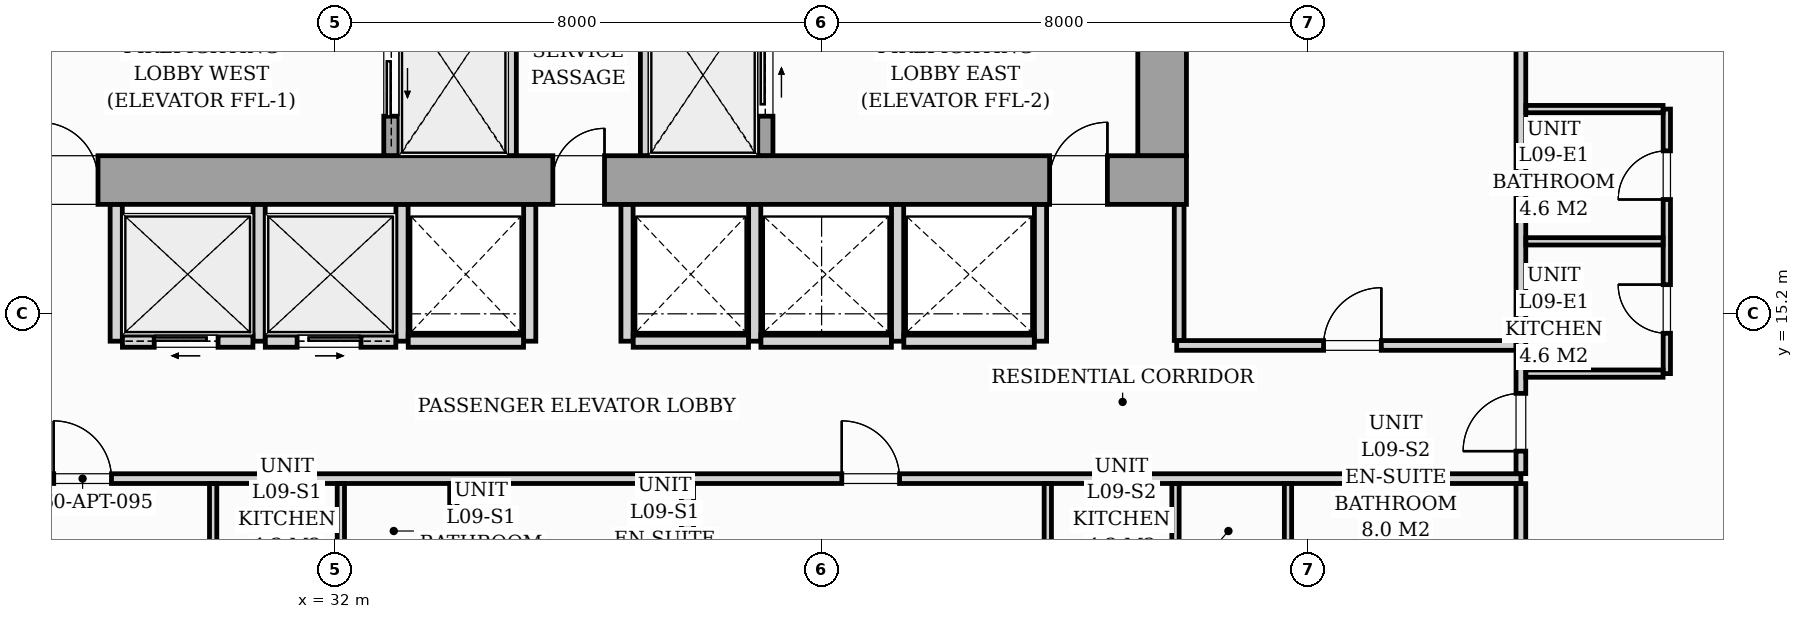
"""IFC4 building model, lengths in metres.
Left out: names, types, materials, properties, quantities, classifications, styles, units other than length and angle.
Written with IfcOpenShell. Run it as: python <this file> out.ifc"""

import sys

from ifc_helpers import new_model, si_unit, direction, frame, frame_2d, origin, origin_2d, place, context, subcontext, project, spatial, rectangle, i_section, extrude, source, transform, mapped, element, fill, save


model = new_model("IFC4")
c1 = context("Model", 3, precision=1e-05, world=origin(), true_north=direction((0.0, 1.0)))
c2 = subcontext(c1, "Body", "Model", "MODEL_VIEW")
j1 = project(units=[si_unit("LENGTHUNIT", "METRE"), si_unit("PLANEANGLEUNIT", "RADIAN")], contexts=[c1])
p1 = place(None, origin())
s1 = spatial("IfcSite", under=j1, at=p1, CompositionType="ELEMENT")
p2 = place(p1, origin())
s2 = spatial("IfcBuilding", under=s1, at=p2, CompositionType="ELEMENT")
p3 = place(p2, frame((0.0, 0.0, 35.8)))
s3 = spatial("IfcBuildingStorey", under=s2, at=p3, CompositionType="ELEMENT", Elevation=35.8)
m1 = source(origin(), c2, "Body", "SweptSolid", [
    extrude(i_section(OverallWidth=0.437, OverallDepth=0.514, WebThickness=0.061, FlangeThickness=0.097, FilletRadius=0.018, at=origin_2d()), origin(), (0.0, 0.0, 1.0), 3.196),
])
for number, where, z_axis, x_axis in (
    (1, (33.12, 17.4, 0.002), (0.0, 0.0, 1.0), (1.0, 0.0, 0.0)),
    (2, (38.88, 17.4, 0.002), (0.0, 0.0, 1.0), (1.0, 0.0, 0.0)),
    (3, (45.6, 17.4, 0.002), (0.0, 0.0, 1.0), (1.0, 0.0, 0.0)),
):
    element("IfcColumn", number, at=place(p3, frame(where, z_axis=z_axis, x_axis=x_axis)), inside=s3, PredefinedType="PILASTER", context=c2, shape_type="MappedRepresentation", body=[
        mapped(m1, transform((0.0, 0.0, 0.0), scale=1.0)),
    ])
p4 = place(p3, frame((26.0, 17.4, 0.0), z_axis=(0.0, 0.0, 1.0), x_axis=(1.0, 0.0, 0.0)))
e4 = element("IfcWall", 4, at=p4, inside=s3, PredefinedType="SHEAR", context=c2, shape_type="SweptSolid", body=[
    extrude(rectangle(XDim=20.0, YDim=0.8, at=frame_2d((10.0, 0.0))), origin(), (0.0, 0.0, 1.0), 3.2),
])
p5 = place(p4, frame((1.15, 0.0, 0.0)))
e5 = element("IfcOpeningElement", 5, at=p5, cuts=e4, PredefinedType="OPENING", context=c2, shape_type="SweptSolid", body=[
    extrude(rectangle(XDim=0.95, YDim=2.06, at=frame_2d((0.475, 1.03))), frame((0.0, 0.41, 0.0), z_axis=(0.0, -1.0, 0.0), x_axis=(1.0, 0.0, 0.0)), (0.0, 0.0, 1.0), 0.82),
])
p6 = place(p4, frame((9.58, 0.0, 0.0)))
e6 = element("IfcOpeningElement", 6, at=p6, cuts=e4, PredefinedType="OPENING", context=c2, shape_type="SweptSolid", body=[
    extrude(rectangle(XDim=0.85, YDim=2.0, at=frame_2d((0.425, 1.0))), frame((0.0, 0.41, 0.0), z_axis=(0.0, -1.0, 0.0), x_axis=(1.0, 0.0, 0.0)), (0.0, 0.0, 1.0), 0.82),
])
p7 = place(p4, frame((17.75, 0.0, 0.0)))
e7 = element("IfcOpeningElement", 7, at=p7, cuts=e4, PredefinedType="OPENING", context=c2, shape_type="SweptSolid", body=[
    extrude(rectangle(XDim=0.95, YDim=2.06, at=frame_2d((0.475, 1.03))), frame((0.0, 0.41, 0.0), z_axis=(0.0, -1.0, 0.0), x_axis=(1.0, 0.0, 0.0)), (0.0, 0.0, 1.0), 0.82),
])
p8 = place(p3, frame((45.6, 17.802, 0.0), z_axis=(0.0, 0.0, 1.0), x_axis=(0.0, 1.0, 0.0)))
e8 = element("IfcWall", 8, at=p8, inside=s3, PredefinedType="SHEAR", context=c2, shape_type="SweptSolid", body=[
    extrude(rectangle(XDim=5.796, YDim=0.8, at=frame_2d((2.898, 0.0))), origin(), (0.0, 0.0, 1.0), 3.2),
])
p9 = place(p3, frame((32.925, 17.802, 0.0), z_axis=(0.0, 0.0, 1.0), x_axis=(0.0, 1.0, 0.0)))
e9 = element("IfcWall", 9, at=p9, inside=s3, PredefinedType="SOLIDWALL", context=c2, shape_type="SweptSolid", body=[
    extrude(rectangle(XDim=2.646, YDim=0.25, at=frame_2d((1.323, 0.0))), origin(), (0.0, 0.0, 1.0), 3.2),
])
p10 = place(p9, frame((0.648, 0.0, 0.0)))
e10 = element("IfcOpeningElement", 10, at=p10, cuts=e9, PredefinedType="OPENING", context=c2, shape_type="SweptSolid", body=[
    extrude(rectangle(XDim=1.1, YDim=2.08, at=frame_2d((0.55, 1.04))), frame((0.0, 0.135, 0.0), z_axis=(0.0, -1.0, 0.0), x_axis=(1.0, 0.0, 0.0)), (0.0, 0.0, 1.0), 0.27),
])
for number, where, z_axis, x_axis in (
    (11, (34.9, 17.802, 0.0), (0.0, 0.0, 1.0), (0.0, 1.0, 0.0)),
    (12, (37.1, 17.802, 0.0), (0.0, 0.0, 1.0), (0.0, 1.0, 0.0)),
):
    element("IfcWall", number, at=place(p3, frame(where, z_axis=z_axis, x_axis=x_axis)), inside=s3, PredefinedType="PARTITIONING", context=c2, shape_type="SweptSolid", body=[
        extrude(rectangle(XDim=2.646, YDim=0.16, at=frame_2d((1.323, 0.0))), origin(), (0.0, 0.0, 1.0), 2.94),
    ])
p11 = place(p3, frame((39.075, 17.802, 0.0), z_axis=(0.0, 0.0, 1.0), x_axis=(0.0, 1.0, 0.0)))
e13 = element("IfcWall", 13, at=p11, inside=s3, PredefinedType="SOLIDWALL", context=c2, shape_type="SweptSolid", body=[
    extrude(rectangle(XDim=2.646, YDim=0.25, at=frame_2d((1.323, 0.0))), origin(), (0.0, 0.0, 1.0), 3.2),
])
p12 = place(p11, frame((0.648, 0.0, 0.0)))
e14 = element("IfcOpeningElement", 14, at=p12, cuts=e13, PredefinedType="OPENING", context=c2, shape_type="SweptSolid", body=[
    extrude(rectangle(XDim=1.1, YDim=2.08, at=frame_2d((0.55, 1.04))), frame((0.0, 0.135, 0.0), z_axis=(0.0, -1.0, 0.0), x_axis=(1.0, 0.0, 0.0)), (0.0, 0.0, 1.0), 0.27),
])
for number, where, z_axis, x_axis in (
    (15, (28.4, 14.75, 0.0), (0.0, 0.0, 1.0), (0.0, 1.0, 0.0)),
    (16, (30.75, 14.75, 0.0), (0.0, 0.0, 1.0), (0.0, 1.0, 0.0)),
    (17, (33.1, 14.75, 0.0), (0.0, 0.0, 1.0), (0.0, 1.0, 0.0)),
):
    element("IfcWall", number, at=place(p3, frame(where, z_axis=z_axis, x_axis=x_axis)), inside=s3, PredefinedType="PARTITIONING", context=c2, shape_type="SweptSolid", body=[
        extrude(rectangle(XDim=2.248, YDim=0.2, at=frame_2d((1.124, 0.0))), origin(), (0.0, 0.0, 1.0), 2.94),
    ])
p13 = place(p3, frame((28.502, 14.75, 0.0), z_axis=(0.0, 0.0, 1.0), x_axis=(1.0, 0.0, 0.0)))
e18 = element("IfcWall", 18, at=p13, inside=s3, PredefinedType="PARTITIONING", context=c2, shape_type="SweptSolid", body=[
    extrude(rectangle(XDim=2.146, YDim=0.2, at=frame_2d((1.073, 0.0))), origin(), (0.0, 0.0, 1.0), 2.94),
])
p14 = place(p13, frame((0.523, 0.0, 0.0)))
e19 = element("IfcOpeningElement", 19, at=p14, cuts=e18, PredefinedType="OPENING", context=c2, shape_type="SweptSolid", body=[
    extrude(rectangle(XDim=1.05, YDim=2.08, at=frame_2d((0.525, 1.04))), frame((0.0, 0.11, 0.0), z_axis=(0.0, -1.0, 0.0), x_axis=(1.0, 0.0, 0.0)), (0.0, 0.0, 1.0), 0.22),
])
p15 = place(p3, frame((30.852, 14.75, 0.0), z_axis=(0.0, 0.0, 1.0), x_axis=(1.0, 0.0, 0.0)))
e20 = element("IfcWall", 20, at=p15, inside=s3, PredefinedType="PARTITIONING", context=c2, shape_type="SweptSolid", body=[
    extrude(rectangle(XDim=2.146, YDim=0.2, at=frame_2d((1.073, 0.0))), origin(), (0.0, 0.0, 1.0), 2.94),
])
p16 = place(p15, frame((0.523, 0.0, 0.0)))
e21 = element("IfcOpeningElement", 21, at=p16, cuts=e20, PredefinedType="OPENING", context=c2, shape_type="SweptSolid", body=[
    extrude(rectangle(XDim=1.05, YDim=2.08, at=frame_2d((0.525, 1.04))), frame((0.0, 0.11, 0.0), z_axis=(0.0, -1.0, 0.0), x_axis=(1.0, 0.0, 0.0)), (0.0, 0.0, 1.0), 0.22),
])
p17 = place(p3, frame((35.2, 14.75, 0.0), z_axis=(0.0, 0.0, 1.0), x_axis=(0.0, 1.0, 0.0)))
e22 = element("IfcWall", 22, at=p17, inside=s3, PredefinedType="PARTITIONING", context=c2, shape_type="SweptSolid", body=[
    extrude(rectangle(XDim=2.248, YDim=0.2, at=frame_2d((1.124, 0.0))), origin(), (0.0, 0.0, 1.0), 2.94),
])
p18 = place(p3, frame((33.202, 14.75, 0.0), z_axis=(0.0, 0.0, 1.0), x_axis=(1.0, 0.0, 0.0)))
e23 = element("IfcWall", 23, at=p18, inside=s3, PredefinedType="PARTITIONING", context=c2, shape_type="SweptSolid", body=[
    extrude(rectangle(XDim=1.896, YDim=0.2, at=frame_2d((0.948, 0.0))), origin(), (0.0, 0.0, 1.0), 2.94),
])
for number, where, z_axis, x_axis in (
    (24, (36.8, 14.75, 0.0), (0.0, 0.0, 1.0), (0.0, 1.0, 0.0)),
    (25, (38.9, 14.75, 0.0), (0.0, 0.0, 1.0), (0.0, 1.0, 0.0)),
):
    element("IfcWall", number, at=place(p3, frame(where, z_axis=z_axis, x_axis=x_axis)), inside=s3, PredefinedType="PARTITIONING", context=c2, shape_type="SweptSolid", body=[
        extrude(rectangle(XDim=2.248, YDim=0.2, at=frame_2d((1.124, 0.0))), origin(), (0.0, 0.0, 1.0), 2.94),
    ])
p19 = place(p3, frame((36.902, 14.75, 0.0), z_axis=(0.0, 0.0, 1.0), x_axis=(1.0, 0.0, 0.0)))
e26 = element("IfcWall", 26, at=p19, inside=s3, PredefinedType="PARTITIONING", context=c2, shape_type="SweptSolid", body=[
    extrude(rectangle(XDim=1.896, YDim=0.2, at=frame_2d((0.948, 0.0))), origin(), (0.0, 0.0, 1.0), 2.94),
])
for number, where, z_axis, x_axis in (
    (27, (41.25, 14.75, 0.0), (0.0, 0.0, 1.0), (0.0, 1.0, 0.0)),
    (28, (43.6, 14.75, 0.0), (0.0, 0.0, 1.0), (0.0, 1.0, 0.0)),
):
    element("IfcWall", number, at=place(p3, frame(where, z_axis=z_axis, x_axis=x_axis)), inside=s3, PredefinedType="PARTITIONING", context=c2, shape_type="SweptSolid", body=[
        extrude(rectangle(XDim=2.248, YDim=0.2, at=frame_2d((1.124, 0.0))), origin(), (0.0, 0.0, 1.0), 2.94),
    ])
for number, where, z_axis, x_axis in (
    (29, (39.002, 14.75, 0.0), (0.0, 0.0, 1.0), (1.0, 0.0, 0.0)),
    (30, (41.352, 14.75, 0.0), (0.0, 0.0, 1.0), (1.0, 0.0, 0.0)),
):
    element("IfcWall", number, at=place(p3, frame(where, z_axis=z_axis, x_axis=x_axis)), inside=s3, PredefinedType="PARTITIONING", context=c2, shape_type="SweptSolid", body=[
        extrude(rectangle(XDim=2.146, YDim=0.2, at=frame_2d((1.073, 0.0))), origin(), (0.0, 0.0, 1.0), 2.94),
    ])
p20 = place(p3, frame((16.3, 12.49, 0.0), z_axis=(0.0, 0.0, 1.0), x_axis=(1.0, 0.0, 0.0)))
e31 = element("IfcWall", 31, at=p20, inside=s3, PredefinedType="PARTITIONING", context=c2, shape_type="SweptSolid", body=[
    extrude(rectangle(XDim=35.2, YDim=0.16, at=frame_2d((17.6, 0.0))), origin(), (0.0, 0.0, 1.0), 2.94),
])
p21 = place(p20, frame((11.072, 0.0, 0.0)))
e32 = element("IfcOpeningElement", 32, at=p21, cuts=e31, PredefinedType="OPENING", context=c2, shape_type="SweptSolid", body=[
    extrude(rectangle(XDim=0.95, YDim=2.06, at=frame_2d((0.475, 1.03))), frame((0.0, 0.09, 0.0), z_axis=(0.0, -1.0, 0.0), x_axis=(1.0, 0.0, 0.0)), (0.0, 0.0, 1.0), 0.18),
])
p22 = place(p20, frame((24.032, 0.0, 0.0)))
e33 = element("IfcOpeningElement", 33, at=p22, cuts=e31, PredefinedType="OPENING", context=c2, shape_type="SweptSolid", body=[
    extrude(rectangle(XDim=0.95, YDim=2.06, at=frame_2d((0.475, 1.03))), frame((0.0, 0.09, 0.0), z_axis=(0.0, -1.0, 0.0), x_axis=(1.0, 0.0, 0.0)), (0.0, 0.0, 1.0), 0.18),
])
p23 = place(p3, frame((51.5, 2.962, 0.0), z_axis=(0.0, 0.0, 1.0), x_axis=(0.0, 1.0, 0.0)))
e34 = element("IfcWall", 34, at=p23, inside=s3, PredefinedType="PARTITIONING", context=c2, shape_type="SweptSolid", body=[
    extrude(rectangle(XDim=9.446, YDim=0.16, at=frame_2d((4.723, 0.0))), origin(), (0.0, 0.0, 1.0), 2.94),
])
p24 = place(p3, frame((51.5, 12.572, 0.0), z_axis=(0.0, 0.0, 1.0), x_axis=(0.0, 1.0, 0.0)))
e35 = element("IfcWall", 35, at=p24, inside=s3, PredefinedType="PARTITIONING", context=c2, shape_type="SweptSolid", body=[
    extrude(rectangle(XDim=14.866, YDim=0.16, at=frame_2d((7.433, 0.0))), origin(), (0.0, 0.0, 1.0), 2.94),
])
p25 = place(p24, frame((0.37, 0.0, 0.0)))
e36 = element("IfcOpeningElement", 36, at=p25, cuts=e35, PredefinedType="OPENING", context=c2, shape_type="SweptSolid", body=[
    extrude(rectangle(XDim=0.95, YDim=2.06, at=frame_2d((0.475, 1.03))), frame((0.0, 0.09, 0.0), z_axis=(0.0, -1.0, 0.0), x_axis=(1.0, 0.0, 0.0)), (0.0, 0.0, 1.0), 0.18),
])
p26 = place(p3, frame((33.944, 2.78, 0.0), z_axis=(0.0, 0.0, 1.0), x_axis=(0.0, 1.0, 0.0)))
e37 = element("IfcWall", 37, at=p26, inside=s3, PredefinedType="PARTITIONING", context=c2, shape_type="SweptSolid", body=[
    extrude(rectangle(XDim=9.628, YDim=0.12, at=frame_2d((4.814, 0.0))), origin(), (0.0, 0.0, 1.0), 2.94),
])
p27 = place(p26, frame((6.36, 0.0, 0.0)))
e38 = element("IfcOpeningElement", 38, at=p27, cuts=e37, PredefinedType="OPENING", context=c2, shape_type="SweptSolid", body=[
    extrude(rectangle(XDim=0.9, YDim=2.05, at=frame_2d((0.45, 1.025))), frame((0.0, 0.07, 0.0), z_axis=(0.0, -1.0, 0.0), x_axis=(1.0, 0.0, 0.0)), (0.0, 0.0, 1.0), 0.14),
])
for number, where, z_axis, x_axis in (
    (39, (32.094, 10.302, 0.0), (0.0, 0.0, 1.0), (0.0, 1.0, 0.0)),
    (40, (29.994, 10.302, 0.0), (0.0, 0.0, 1.0), (0.0, 1.0, 0.0)),
):
    element("IfcWall", number, at=place(p3, frame(where, z_axis=z_axis, x_axis=x_axis)), inside=s3, PredefinedType="PARTITIONING", context=c2, shape_type="SweptSolid", body=[
        extrude(rectangle(XDim=2.106, YDim=0.12, at=frame_2d((1.053, 0.0))), origin(), (0.0, 0.0, 1.0), 2.94),
    ])
p28 = place(p3, frame((37.794, 10.252, 0.0), z_axis=(0.0, 0.0, 1.0), x_axis=(0.0, 1.0, 0.0)))
e41 = element("IfcWall", 41, at=p28, inside=s3, PredefinedType="PARTITIONING", context=c2, shape_type="SweptSolid", body=[
    extrude(rectangle(XDim=2.156, YDim=0.2, at=frame_2d((1.078, 0.0))), origin(), (0.0, 0.0, 1.0), 2.94),
])
p29 = place(p3, frame((47.67, 2.962, 0.0), z_axis=(0.0, 0.0, 1.0), x_axis=(0.0, 1.0, 0.0)))
e42 = element("IfcWall", 42, at=p29, inside=s3, PredefinedType="PARTITIONING", context=c2, shape_type="SweptSolid", body=[
    extrude(rectangle(XDim=9.446, YDim=0.12, at=frame_2d((4.723, 0.0))), origin(), (0.0, 0.0, 1.0), 2.94),
])
p30 = place(p29, frame((6.178, 0.0, 0.0)))
e43 = element("IfcOpeningElement", 43, at=p30, cuts=e42, PredefinedType="OPENING", context=c2, shape_type="SweptSolid", body=[
    extrude(rectangle(XDim=0.9, YDim=2.05, at=frame_2d((0.45, 1.025))), frame((0.0, 0.07, 0.0), z_axis=(0.0, -1.0, 0.0), x_axis=(1.0, 0.0, 0.0)), (0.0, 0.0, 1.0), 0.14),
])
for number, where, z_axis, x_axis in (
    (44, (45.82, 10.302, 0.0), (0.0, 0.0, 1.0), (0.0, 1.0, 0.0)),
    (45, (43.72, 10.302, 0.0), (0.0, 0.0, 1.0), (0.0, 1.0, 0.0)),
):
    element("IfcWall", number, at=place(p3, frame(where, z_axis=z_axis, x_axis=x_axis)), inside=s3, PredefinedType="PARTITIONING", context=c2, shape_type="SweptSolid", body=[
        extrude(rectangle(XDim=2.106, YDim=0.12, at=frame_2d((1.053, 0.0))), origin(), (0.0, 0.0, 1.0), 2.94),
    ])
p31 = place(p3, frame((53.9, 14.217, 0.0), z_axis=(0.0, 0.0, 1.0), x_axis=(0.0, 1.0, 0.0)))
e46 = element("IfcWall", 46, at=p31, inside=s3, PredefinedType="PARTITIONING", context=c2, shape_type="SweptSolid", body=[
    extrude(rectangle(XDim=4.35, YDim=0.12, at=frame_2d((2.175, 0.0))), origin(), (0.0, 0.0, 1.0), 2.94),
])
p32 = place(p31, frame((0.663, 0.0, 0.0)))
e47 = element("IfcOpeningElement", 47, at=p32, cuts=e46, PredefinedType="OPENING", context=c2, shape_type="SweptSolid", body=[
    extrude(rectangle(XDim=0.8, YDim=2.0, at=frame_2d((0.4, 1.0))), frame((0.0, 0.07, 0.0), z_axis=(0.0, -1.0, 0.0), x_axis=(1.0, 0.0, 0.0)), (0.0, 0.0, 1.0), 0.14),
])
p33 = place(p31, frame((2.863, 0.0, 0.0)))
e48 = element("IfcOpeningElement", 48, at=p33, cuts=e46, PredefinedType="OPENING", context=c2, shape_type="SweptSolid", body=[
    extrude(rectangle(XDim=0.8, YDim=2.02, at=frame_2d((0.4, 1.01))), frame((0.0, 0.07, 0.0), z_axis=(0.0, -1.0, 0.0), x_axis=(1.0, 0.0, 0.0)), (0.0, 0.0, 1.0), 0.14),
])
p34 = place(p3, frame((51.582, 16.392, 0.0), z_axis=(0.0, 0.0, 1.0), x_axis=(1.0, 0.0, 0.0)))
e49 = element("IfcWall", 49, at=p34, inside=s3, PredefinedType="PARTITIONING", context=c2, shape_type="SweptSolid", body=[
    extrude(rectangle(XDim=2.256, YDim=0.12, at=frame_2d((1.128, 0.0))), origin(), (0.0, 0.0, 1.0), 2.045),
])
for number, where, z_axis, x_axis in (
    (50, (51.582, 14.217, 0.0), (0.0, 0.0, 1.0), (1.0, 0.0, 0.0)),
    (51, (51.582, 18.567, 0.0), (0.0, 0.0, 1.0), (1.0, 0.0, 0.0)),
):
    element("IfcWall", number, at=place(p3, frame(where, z_axis=z_axis, x_axis=x_axis)), inside=s3, PredefinedType="PARTITIONING", context=c2, shape_type="SweptSolid", body=[
        extrude(rectangle(XDim=2.256, YDim=0.12, at=frame_2d((1.128, 0.0))), origin(), (0.0, 0.0, 1.0), 2.94),
    ])
p35 = place(p3, frame((45.84, 14.68, 0.0), z_axis=(0.0, 0.0, 1.0), x_axis=(1.0, 0.0, 0.0)))
e52 = element("IfcWall", 52, at=p35, inside=s3, PredefinedType="PARTITIONING", context=c2, shape_type="SweptSolid", body=[
    extrude(rectangle(XDim=5.578, YDim=0.16, at=frame_2d((2.789, 0.0))), origin(), (0.0, 0.0, 1.0), 2.94),
])
p36 = place(p35, frame((2.415, 0.0, 0.0)))
e53 = element("IfcOpeningElement", 53, at=p36, cuts=e52, PredefinedType="OPENING", context=c2, shape_type="SweptSolid", body=[
    extrude(rectangle(XDim=0.95, YDim=2.06, at=frame_2d((0.475, 1.03))), frame((0.0, 0.09, 0.0), z_axis=(0.0, -1.0, 0.0), x_axis=(1.0, 0.0, 0.0)), (0.0, 0.0, 1.0), 0.18),
])
p37 = place(p3, frame((45.88, 14.762, 0.0), z_axis=(0.0, 0.0, 1.0), x_axis=(0.0, 1.0, 0.0)))
e54 = element("IfcWall", 54, at=p37, inside=s3, PredefinedType="PARTITIONING", context=c2, shape_type="SweptSolid", body=[
    extrude(rectangle(XDim=2.236, YDim=0.16, at=frame_2d((1.118, 0.0))), origin(), (0.0, 0.0, 1.0), 2.94),
])
m2 = source(origin(), c2, "Body", "SweptSolid", [
    extrude(rectangle(XDim=0.95, YDim=2.06, at=frame_2d((0.475, 1.03))), frame((0.0, 0.025, 0.0), z_axis=(0.0, -1.0, 0.0), x_axis=(1.0, 0.0, 0.0)), (0.0, 0.0, 1.0), 0.05),
])
p38 = place(p5, origin())
e55 = element("IfcDoor", 55, at=p38, inside=s3, OperationType="SINGLE_SWING_LEFT", PredefinedType="DOOR", context=c2, shape_type="MappedRepresentation", body=[
    mapped(m2, transform((0.0, 0.0, 0.0), scale=1.0)),
])
fill(e5, e55)
m3 = source(origin(), c2, "Body", "SweptSolid", [
    extrude(rectangle(XDim=0.85, YDim=2.0, at=frame_2d((0.425, 1.0))), frame((0.0, 0.025, 0.0), z_axis=(0.0, -1.0, 0.0), x_axis=(1.0, 0.0, 0.0)), (0.0, 0.0, 1.0), 0.05),
])
p39 = place(p6, origin())
e56 = element("IfcDoor", 56, at=p39, inside=s3, OperationType="SINGLE_SWING_RIGHT", PredefinedType="DOOR", context=c2, shape_type="MappedRepresentation", body=[
    mapped(m3, transform((0.0, 0.0, 0.0), scale=1.0)),
])
fill(e6, e56)
p40 = place(p7, origin())
e57 = element("IfcDoor", 57, at=p40, inside=s3, OperationType="SINGLE_SWING_RIGHT", PredefinedType="DOOR", context=c2, shape_type="MappedRepresentation", body=[
    mapped(m2, transform((0.0, 0.0, 0.0), scale=1.0)),
])
fill(e7, e57)
m4 = source(origin(), c2, "Body", "SweptSolid", [
    extrude(rectangle(XDim=1.1, YDim=2.08, at=frame_2d((0.55, 1.04))), frame((0.0, 0.025, 0.0), z_axis=(0.0, -1.0, 0.0), x_axis=(1.0, 0.0, 0.0)), (0.0, 0.0, 1.0), 0.05),
])
p41 = place(p10, origin())
e58 = element("IfcDoor", 58, at=p41, inside=s3, OperationType="SLIDING_TO_LEFT", PredefinedType="DOOR", context=c2, shape_type="MappedRepresentation", body=[
    mapped(m4, transform((0.0, 0.0, 0.0), scale=1.0)),
])
fill(e10, e58)
p42 = place(p12, origin())
e59 = element("IfcDoor", 59, at=p42, inside=s3, OperationType="SLIDING_TO_RIGHT", PredefinedType="DOOR", context=c2, shape_type="MappedRepresentation", body=[
    mapped(m4, transform((0.0, 0.0, 0.0), scale=1.0)),
])
fill(e14, e59)
m5 = source(origin(), c2, "Body", "SweptSolid", [
    extrude(rectangle(XDim=1.05, YDim=2.08, at=frame_2d((0.525, 1.04))), frame((0.0, 0.025, 0.0), z_axis=(0.0, -1.0, 0.0), x_axis=(1.0, 0.0, 0.0)), (0.0, 0.0, 1.0), 0.05),
])
p43 = place(p14, origin())
e60 = element("IfcDoor", 60, at=p43, inside=s3, OperationType="SLIDING_TO_LEFT", PredefinedType="DOOR", context=c2, shape_type="MappedRepresentation", body=[
    mapped(m5, transform((0.0, 0.0, 0.0), scale=1.0)),
])
fill(e19, e60)
p44 = place(p16, origin())
e61 = element("IfcDoor", 61, at=p44, inside=s3, OperationType="SLIDING_TO_RIGHT", PredefinedType="DOOR", context=c2, shape_type="MappedRepresentation", body=[
    mapped(m5, transform((0.0, 0.0, 0.0), scale=1.0)),
])
fill(e21, e61)
m6 = source(origin(), c2, "Body", "SweptSolid", [
    extrude(rectangle(XDim=0.95, YDim=2.06, at=frame_2d((0.475, 1.03))), frame((0.0, 0.025, 0.0), z_axis=(0.0, -1.0, 0.0), x_axis=(1.0, 0.0, 0.0)), (0.0, 0.0, 1.0), 0.05),
])
p45 = place(p21, origin())
e62 = element("IfcDoor", 62, at=p45, inside=s3, OperationType="SINGLE_SWING_LEFT", PredefinedType="DOOR", context=c2, shape_type="MappedRepresentation", body=[
    mapped(m6, transform((0.0, 0.0, 0.0), scale=1.0)),
])
fill(e32, e62)
p46 = place(p22, origin())
e63 = element("IfcDoor", 63, at=p46, inside=s3, OperationType="SINGLE_SWING_LEFT", PredefinedType="DOOR", context=c2, shape_type="MappedRepresentation", body=[
    mapped(m6, transform((0.0, 0.0, 0.0), scale=1.0)),
])
fill(e33, e63)
p47 = place(p25, origin())
e64 = element("IfcDoor", 64, at=p47, inside=s3, OperationType="SINGLE_SWING_LEFT", PredefinedType="DOOR", context=c2, shape_type="MappedRepresentation", body=[
    mapped(m6, transform((0.0, 0.0, 0.0), scale=1.0)),
])
fill(e36, e64)
m7 = source(origin(), c2, "Body", "SweptSolid", [
    extrude(rectangle(XDim=0.8, YDim=2.0, at=frame_2d((0.4, 1.0))), frame((0.0, 0.025, 0.0), z_axis=(0.0, -1.0, 0.0), x_axis=(1.0, 0.0, 0.0)), (0.0, 0.0, 1.0), 0.05),
])
p48 = place(p32, origin())
e65 = element("IfcDoor", 65, at=p48, inside=s3, OperationType="SINGLE_SWING_RIGHT", PredefinedType="DOOR", context=c2, shape_type="MappedRepresentation", body=[
    mapped(m7, transform((0.0, 0.0, 0.0), scale=1.0)),
])
fill(e47, e65)
m8 = source(origin(), c2, "Body", "SweptSolid", [
    extrude(rectangle(XDim=0.8, YDim=2.02, at=frame_2d((0.4, 1.01))), frame((0.0, 0.025, 0.0), z_axis=(0.0, -1.0, 0.0), x_axis=(1.0, 0.0, 0.0)), (0.0, 0.0, 1.0), 0.05),
])
p49 = place(p33, origin())
e66 = element("IfcDoor", 66, at=p49, inside=s3, OperationType="SINGLE_SWING_LEFT", PredefinedType="DOOR", context=c2, shape_type="MappedRepresentation", body=[
    mapped(m8, transform((0.0, 0.0, 0.0), scale=1.0)),
])
fill(e48, e66)
p50 = place(p36, origin())
e67 = element("IfcDoor", 67, at=p50, inside=s3, OperationType="SINGLE_SWING_RIGHT", PredefinedType="DOOR", context=c2, shape_type="MappedRepresentation", body=[
    mapped(m6, transform((0.0, 0.0, 0.0), scale=1.0)),
])
fill(e53, e67)
save(model, sys.argv[1])
